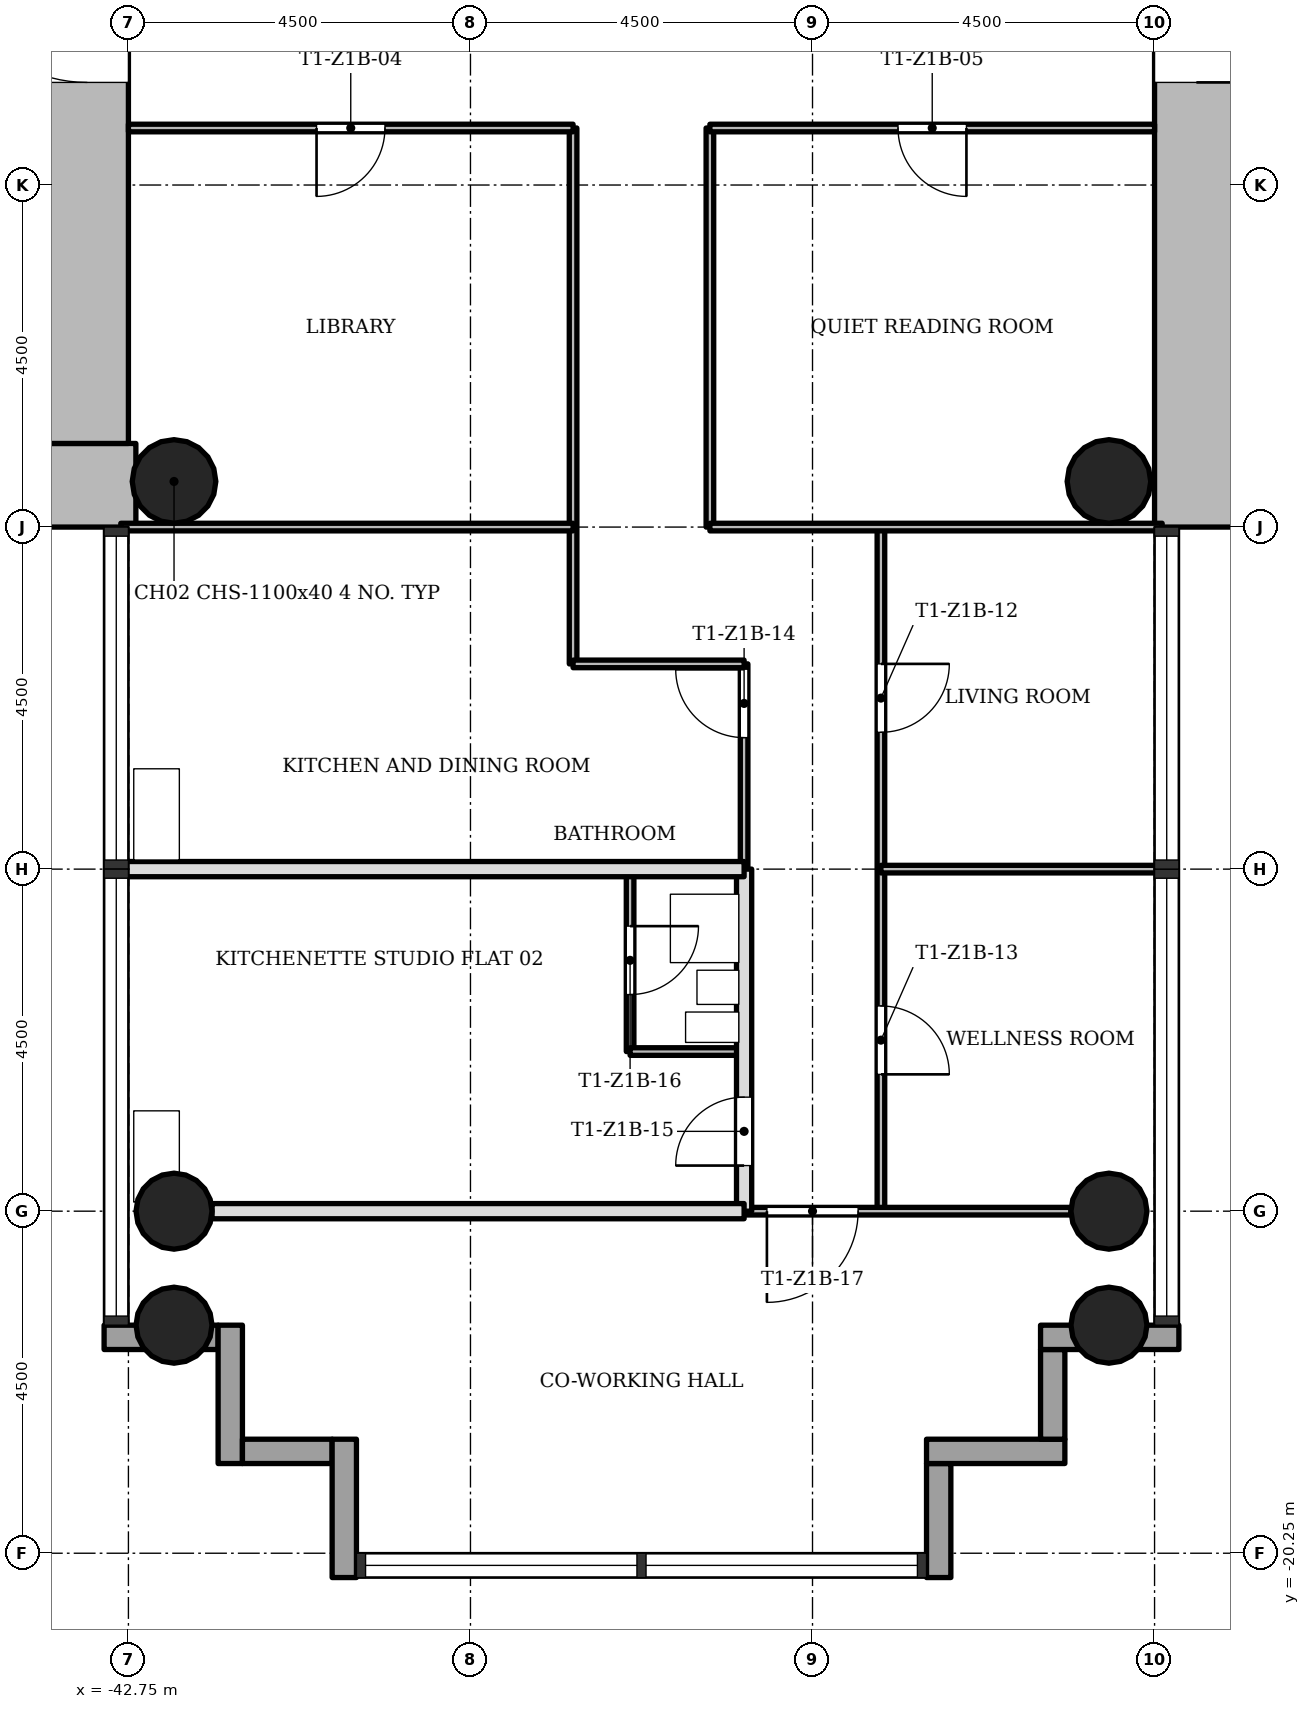
"""IFC4 building model, lengths in metres.
Left out: names, types, materials, properties, quantities, classifications, styles, units other than length and angle.
Written with IfcOpenShell. Run it as: python <this file> out.ifc"""

import sys

from ifc_helpers import new_model, si_unit, direction, frame, frame_2d, origin, origin_2d, place, context, subcontext, project, spatial, rectangle, hollow_circle, extrude, element, fill, save


model = new_model("IFC4")
c1 = context("Model", 3, precision=1e-05, world=origin(), true_north=direction((0.0, 1.0)))
c2 = subcontext(c1, "Body", "Model", "MODEL_VIEW")
j1 = project(units=[si_unit("LENGTHUNIT", "METRE"), si_unit("PLANEANGLEUNIT", "RADIAN")], contexts=[c1])
p1 = place(None, origin())
s1 = spatial("IfcSite", under=j1, at=p1, CompositionType="ELEMENT")
p2 = place(p1, origin())
s2 = spatial("IfcBuilding", under=s1, at=p2, CompositionType="ELEMENT")
p3 = place(p2, frame((0.0, 0.0, 34.7)))
s3 = spatial("IfcBuildingStorey", under=s2, at=p3, CompositionType="ELEMENT", Elevation=34.7)
p4 = place(p3, frame((-28.7, 5.65, 0.0), z_axis=(0.0, 0.0, 1.0), x_axis=(0.0, -1.0, 0.0)))
e1 = element("IfcWall", 1, at=p4, inside=s3, PredefinedType="SHEAR", context=c2, shape_type="SweptSolid", body=[
    extrude(rectangle(XDim=12.4, YDim=1.1, at=frame_2d((6.2, 0.0))), origin(), (0.0, 0.0, 1.0), 3.4),
])
p5 = place(p4, frame((4.75, 0.0, 0.0)))
e2 = element("IfcOpeningElement", 2, at=p5, cuts=e1, PredefinedType="OPENING", context=c2, shape_type="SweptSolid", body=[
    extrude(rectangle(XDim=1.8, YDim=2.1, at=frame_2d((0.9, 1.05))), frame((0.0, 0.56, 0.0), z_axis=(0.0, -1.0, 0.0), x_axis=(1.0, 0.0, 0.0)), (0.0, 0.0, 1.0), 1.12),
])
p6 = place(p3, frame((-50.65, -6.2, 0.0), z_axis=(0.0, 0.0, 1.0), x_axis=(1.0, 0.0, 0.0)))
e3 = element("IfcWall", 3, at=p6, inside=s3, PredefinedType="SHEAR", context=c2, shape_type="SweptSolid", body=[
    extrude(rectangle(XDim=7.998, YDim=1.1, at=frame_2d((3.999, 0.0))), origin(), (0.0, 0.0, 1.0), 3.4),
])
p7 = place(p3, frame((-43.3, -5.65, 0.0), z_axis=(0.0, 0.0, 1.0), x_axis=(0.0, 1.0, 0.0)))
e4 = element("IfcWall", 4, at=p7, inside=s3, PredefinedType="SHEAR", context=c2, shape_type="SweptSolid", body=[
    extrude(rectangle(XDim=12.4, YDim=1.1, at=frame_2d((6.2, 0.0))), origin(), (0.0, 0.0, 1.0), 3.4),
])
p8 = place(p7, frame((4.75, 0.0, 0.0)))
e5 = element("IfcOpeningElement", 5, at=p8, cuts=e4, PredefinedType="OPENING", context=c2, shape_type="SweptSolid", body=[
    extrude(rectangle(XDim=1.8, YDim=2.1, at=frame_2d((0.9, 1.05))), frame((0.0, 0.56, 0.0), z_axis=(0.0, -1.0, 0.0), x_axis=(1.0, 0.0, 0.0)), (0.0, 0.0, 1.0), 1.12),
])
for number, where, z_axis, x_axis in (
    (6, (-42.15, -15.75, 0.0), (0.0, 0.0, 1.0), (1.0, 0.0, 0.0)),
    (7, (-29.85, -15.75, 0.0), (0.0, 0.0, 1.0), (1.0, 0.0, 0.0)),
    (8, (-42.15, -17.25, 0.0), (0.0, 0.0, 1.0), (1.0, 0.0, 0.0)),
    (9, (-29.85, -17.25, 0.0), (0.0, 0.0, 1.0), (1.0, 0.0, 0.0)),
):
    element("IfcColumn", number, at=place(p3, frame(where, z_axis=z_axis, x_axis=x_axis)), inside=s3, PredefinedType="COLUMN", context=c2, shape_type="SweptSolid", body=[
        extrude(hollow_circle(Radius=0.5, WallThickness=0.036, at=origin_2d()), origin(), (0.0, 0.0, 1.0), 3.4),
    ])
for number, where, z_axis, x_axis in (
    (10, (-42.15, -6.15, 0.0), (0.0, 0.0, 1.0), (1.0, 0.0, 0.0)),
    (11, (-29.85, -6.15, 0.0), (0.0, 0.0, 1.0), (1.0, 0.0, 0.0)),
):
    element("IfcColumn", number, at=place(p3, frame(where, z_axis=z_axis, x_axis=x_axis)), inside=s3, PredefinedType="COLUMN", context=c2, shape_type="SweptSolid", body=[
        extrude(hollow_circle(Radius=0.55, WallThickness=0.04, at=origin_2d()), origin(), (0.0, 0.0, 1.0), 3.4),
    ])
p9 = place(p3, frame((-43.07, -17.41, -0.3), z_axis=(0.0, 0.0, 1.0), x_axis=(1.0, 0.0, 0.0)))
e12 = element("IfcWall", 12, at=p9, inside=s3, PredefinedType="STANDARD", context=c2, shape_type="SweptSolid", body=[
    extrude(rectangle(XDim=1.5, YDim=0.32, at=frame_2d((0.75, 0.0))), origin(), (0.0, 0.0, 1.0), 3.4),
])
p10 = place(p3, frame((-41.41, -17.25, -0.3), z_axis=(0.0, 0.0, 1.0), x_axis=(0.0, -1.0, 0.0)))
e13 = element("IfcWall", 13, at=p10, inside=s3, PredefinedType="STANDARD", context=c2, shape_type="SweptSolid", body=[
    extrude(rectangle(XDim=1.82, YDim=0.32, at=frame_2d((0.91, 0.0))), origin(), (0.0, 0.0, 1.0), 3.4),
])
p11 = place(p3, frame((-41.25, -18.91, -0.3), z_axis=(0.0, 0.0, 1.0), x_axis=(1.0, 0.0, 0.0)))
e14 = element("IfcWall", 14, at=p11, inside=s3, PredefinedType="STANDARD", context=c2, shape_type="SweptSolid", body=[
    extrude(rectangle(XDim=1.18, YDim=0.32, at=frame_2d((0.59, 0.0))), origin(), (0.0, 0.0, 1.0), 3.4),
])
p12 = place(p3, frame((-39.91, -18.75, -0.3), z_axis=(0.0, 0.0, 1.0), x_axis=(0.0, -1.0, 0.0)))
e15 = element("IfcWall", 15, at=p12, inside=s3, PredefinedType="STANDARD", context=c2, shape_type="SweptSolid", body=[
    extrude(rectangle(XDim=1.82, YDim=0.32, at=frame_2d((0.91, 0.0))), origin(), (0.0, 0.0, 1.0), 3.4),
])
p13 = place(p3, frame((-32.09, -20.57, -0.3), z_axis=(0.0, 0.0, 1.0), x_axis=(0.0, 1.0, 0.0)))
e16 = element("IfcWall", 16, at=p13, inside=s3, PredefinedType="STANDARD", context=c2, shape_type="SweptSolid", body=[
    extrude(rectangle(XDim=1.5, YDim=0.32, at=frame_2d((0.75, 0.0))), origin(), (0.0, 0.0, 1.0), 3.4),
])
p14 = place(p3, frame((-32.25, -18.91, -0.3), z_axis=(0.0, 0.0, 1.0), x_axis=(1.0, 0.0, 0.0)))
e17 = element("IfcWall", 17, at=p14, inside=s3, PredefinedType="STANDARD", context=c2, shape_type="SweptSolid", body=[
    extrude(rectangle(XDim=1.82, YDim=0.32, at=frame_2d((0.91, 0.0))), origin(), (0.0, 0.0, 1.0), 3.4),
])
p15 = place(p3, frame((-30.59, -18.75, -0.3), z_axis=(0.0, 0.0, 1.0), x_axis=(0.0, 1.0, 0.0)))
e18 = element("IfcWall", 18, at=p15, inside=s3, PredefinedType="STANDARD", context=c2, shape_type="SweptSolid", body=[
    extrude(rectangle(XDim=1.18, YDim=0.32, at=frame_2d((0.59, 0.0))), origin(), (0.0, 0.0, 1.0), 3.4),
])
p16 = place(p3, frame((-30.75, -17.41, -0.3), z_axis=(0.0, 0.0, 1.0), x_axis=(1.0, 0.0, 0.0)))
e19 = element("IfcWall", 19, at=p16, inside=s3, PredefinedType="STANDARD", context=c2, shape_type="SweptSolid", body=[
    extrude(rectangle(XDim=1.82, YDim=0.32, at=frame_2d((0.91, 0.0))), origin(), (0.0, 0.0, 1.0), 3.4),
])
p17 = place(p3, frame((-36.9, -8.55, 0.0), z_axis=(0.0, 0.0, 1.0), x_axis=(0.0, 1.0, 0.0)))
e20 = element("IfcWall", 20, at=p17, inside=s3, PredefinedType="PARTITIONING", context=c2, shape_type="SweptSolid", body=[
    extrude(rectangle(XDim=7.05, YDim=0.1, at=frame_2d((3.525, 0.0))), origin(), (0.0, 0.0, 1.0), 3.0),
])
p18 = place(p3, frame((-36.15, -13.65, 0.0), z_axis=(0.0, 0.0, 1.0), x_axis=(0.0, 1.0, 0.0)))
e21 = element("IfcWall", 21, at=p18, inside=s3, PredefinedType="PARTITIONING", context=c2, shape_type="SweptSolid", body=[
    extrude(rectangle(XDim=2.4, YDim=0.1, at=frame_2d((1.2, 0.0))), origin(), (0.0, 0.0, 1.0), 3.0),
])
p19 = place(p18, frame((0.75, 0.0, 0.0)))
e22 = element("IfcOpeningElement", 22, at=p19, cuts=e21, PredefinedType="OPENING", context=c2, shape_type="SweptSolid", body=[
    extrude(rectangle(XDim=0.9, YDim=2.1, at=frame_2d((0.45, 1.05))), frame((0.0, 0.06, 0.0), z_axis=(0.0, -1.0, 0.0), x_axis=(1.0, 0.0, 0.0)), (0.0, 0.0, 1.0), 0.12),
])
p20 = place(p3, frame((-35.1, -6.75, 0.0), z_axis=(0.0, 0.0, 1.0), x_axis=(0.0, 1.0, 0.0)))
e23 = element("IfcWall", 23, at=p20, inside=s3, PredefinedType="PARTITIONING", context=c2, shape_type="SweptSolid", body=[
    extrude(rectangle(XDim=5.25, YDim=0.1, at=frame_2d((2.625, 0.0))), origin(), (0.0, 0.0, 1.0), 3.0),
])
p21 = place(p3, frame((-34.65, -11.25, 0.0), z_axis=(0.0, 0.0, 1.0), x_axis=(0.0, 1.0, 0.0)))
e24 = element("IfcWall", 24, at=p21, inside=s3, PredefinedType="PARTITIONING", context=c2, shape_type="SweptSolid", body=[
    extrude(rectangle(XDim=2.7, YDim=0.1, at=frame_2d((1.35, 0.0))), origin(), (0.0, 0.0, 1.0), 3.0),
])
p22 = place(p21, frame((1.73, 0.0, 0.0)))
e25 = element("IfcOpeningElement", 25, at=p22, cuts=e24, PredefinedType="OPENING", context=c2, shape_type="SweptSolid", body=[
    extrude(rectangle(XDim=0.9, YDim=2.1, at=frame_2d((0.45, 1.05))), frame((0.0, 0.06, 0.0), z_axis=(0.0, -1.0, 0.0), x_axis=(1.0, 0.0, 0.0)), (0.0, 0.0, 1.0), 0.12),
])
p23 = place(p3, frame((-34.65, -15.75, 0.0), z_axis=(0.0, 0.0, 1.0), x_axis=(0.0, 1.0, 0.0)))
e26 = element("IfcWall", 26, at=p23, inside=s3, PredefinedType="SOLIDWALL", context=c2, shape_type="SweptSolid", body=[
    extrude(rectangle(XDim=4.5, YDim=0.2, at=frame_2d((2.25, 0.0))), origin(), (0.0, 0.0, 1.0), 3.0),
])
p24 = place(p23, frame((0.6, 0.0, 0.0)))
e27 = element("IfcOpeningElement", 27, at=p24, cuts=e26, PredefinedType="OPENING", context=c2, shape_type="SweptSolid", body=[
    extrude(rectangle(XDim=0.9, YDim=2.1, at=frame_2d((0.45, 1.05))), frame((0.0, 0.11, 0.0), z_axis=(0.0, -1.0, 0.0), x_axis=(1.0, 0.0, 0.0)), (0.0, 0.0, 1.0), 0.22),
])
p25 = place(p3, frame((-32.85, -15.75, 0.0), z_axis=(0.0, 0.0, 1.0), x_axis=(0.0, 1.0, 0.0)))
e28 = element("IfcWall", 28, at=p25, inside=s3, PredefinedType="PARTITIONING", context=c2, shape_type="SweptSolid", body=[
    extrude(rectangle(XDim=9.0, YDim=0.1, at=frame_2d((4.5, 0.0))), origin(), (0.0, 0.0, 1.0), 3.0),
])
p26 = place(p25, frame((6.3, 0.0, 0.0)))
e29 = element("IfcOpeningElement", 29, at=p26, cuts=e28, PredefinedType="OPENING", context=c2, shape_type="SweptSolid", body=[
    extrude(rectangle(XDim=0.9, YDim=2.1, at=frame_2d((0.45, 1.05))), frame((0.0, 0.06, 0.0), z_axis=(0.0, -1.0, 0.0), x_axis=(1.0, 0.0, 0.0)), (0.0, 0.0, 1.0), 0.12),
])
p27 = place(p25, frame((1.8, 0.0, 0.0)))
e30 = element("IfcOpeningElement", 30, at=p27, cuts=e28, PredefinedType="OPENING", context=c2, shape_type="SweptSolid", body=[
    extrude(rectangle(XDim=0.9, YDim=2.1, at=frame_2d((0.45, 1.05))), frame((0.0, 0.06, 0.0), z_axis=(0.0, -1.0, 0.0), x_axis=(1.0, 0.0, 0.0)), (0.0, 0.0, 1.0), 0.12),
])
p28 = place(p3, frame((-34.65, -15.75, 0.0), z_axis=(0.0, 0.0, 1.0), x_axis=(1.0, 0.0, 0.0)))
e31 = element("IfcWall", 31, at=p28, inside=s3, PredefinedType="PARTITIONING", context=c2, shape_type="SweptSolid", body=[
    extrude(rectangle(XDim=4.3, YDim=0.1, at=frame_2d((2.15, 0.0))), origin(), (0.0, 0.0, 1.0), 3.0),
])
p29 = place(p28, frame((0.3, 0.0, 0.0)))
e32 = element("IfcOpeningElement", 32, at=p29, cuts=e31, PredefinedType="OPENING", context=c2, shape_type="SweptSolid", body=[
    extrude(rectangle(XDim=1.2, YDim=2.1, at=frame_2d((0.6, 1.05))), frame((0.0, 0.06, 0.0), z_axis=(0.0, -1.0, 0.0), x_axis=(1.0, 0.0, 0.0)), (0.0, 0.0, 1.0), 0.12),
])
p30 = place(p3, frame((-41.65, -15.75, 0.0), z_axis=(0.0, 0.0, 1.0), x_axis=(1.0, 0.0, 0.0)))
e33 = element("IfcWall", 33, at=p30, inside=s3, PredefinedType="SOLIDWALL", context=c2, shape_type="SweptSolid", body=[
    extrude(rectangle(XDim=7.0, YDim=0.2, at=frame_2d((3.5, 0.0))), origin(), (0.0, 0.0, 1.0), 3.0),
])
p31 = place(p3, frame((-36.15, -13.65, 0.0), z_axis=(0.0, 0.0, 1.0), x_axis=(1.0, 0.0, 0.0)))
e34 = element("IfcWall", 34, at=p31, inside=s3, PredefinedType="PARTITIONING", context=c2, shape_type="SweptSolid", body=[
    extrude(rectangle(XDim=1.5, YDim=0.1, at=frame_2d((0.75, 0.0))), origin(), (0.0, 0.0, 1.0), 3.0),
])
p32 = place(p3, frame((-32.85, -11.25, 0.0), z_axis=(0.0, 0.0, 1.0), x_axis=(1.0, 0.0, 0.0)))
e35 = element("IfcWall", 35, at=p32, inside=s3, PredefinedType="PARTITIONING", context=c2, shape_type="SweptSolid", body=[
    extrude(rectangle(XDim=3.7, YDim=0.1, at=frame_2d((1.85, 0.0))), origin(), (0.0, 0.0, 1.0), 3.0),
])
p33 = place(p3, frame((-42.85, -11.25, 0.0), z_axis=(0.0, 0.0, 1.0), x_axis=(1.0, 0.0, 0.0)))
e36 = element("IfcWall", 36, at=p33, inside=s3, PredefinedType="SOLIDWALL", context=c2, shape_type="SweptSolid", body=[
    extrude(rectangle(XDim=8.2, YDim=0.2, at=frame_2d((4.1, 0.0))), origin(), (0.0, 0.0, 1.0), 3.0),
])
p34 = place(p3, frame((-36.9, -8.55, 0.0), z_axis=(0.0, 0.0, 1.0), x_axis=(1.0, 0.0, 0.0)))
e37 = element("IfcWall", 37, at=p34, inside=s3, PredefinedType="PARTITIONING", context=c2, shape_type="SweptSolid", body=[
    extrude(rectangle(XDim=2.25, YDim=0.1, at=frame_2d((1.125, 0.0))), origin(), (0.0, 0.0, 1.0), 3.0),
])
for number, where, z_axis, x_axis in (
    (38, (-42.85, -6.75, 0.0), (0.0, 0.0, 1.0), (1.0, 0.0, 0.0)),
    (39, (-35.1, -6.75, 0.0), (0.0, 0.0, 1.0), (1.0, 0.0, 0.0)),
):
    element("IfcWall", number, at=place(p3, frame(where, z_axis=z_axis, x_axis=x_axis)), inside=s3, PredefinedType="PARTITIONING", context=c2, shape_type="SweptSolid", body=[
        extrude(rectangle(XDim=5.95, YDim=0.1, at=frame_2d((2.975, 0.0))), origin(), (0.0, 0.0, 1.0), 3.0),
    ])
p35 = place(p3, frame((-42.75, -1.5, 0.0), z_axis=(0.0, 0.0, 1.0), x_axis=(1.0, 0.0, 0.0)))
e40 = element("IfcWall", 40, at=p35, inside=s3, PredefinedType="PARTITIONING", context=c2, shape_type="SweptSolid", body=[
    extrude(rectangle(XDim=5.85, YDim=0.1, at=frame_2d((2.925, 0.0))), origin(), (0.0, 0.0, 1.0), 3.0),
])
p36 = place(p35, frame((2.475, 0.0, 0.0)))
e41 = element("IfcOpeningElement", 41, at=p36, cuts=e40, PredefinedType="OPENING", context=c2, shape_type="SweptSolid", body=[
    extrude(rectangle(XDim=0.9, YDim=2.1, at=frame_2d((0.45, 1.05))), frame((0.0, 0.06, 0.0), z_axis=(0.0, -1.0, 0.0), x_axis=(1.0, 0.0, 0.0)), (0.0, 0.0, 1.0), 0.12),
])
p37 = place(p3, frame((-35.1, -1.5, 0.0), z_axis=(0.0, 0.0, 1.0), x_axis=(1.0, 0.0, 0.0)))
e42 = element("IfcWall", 42, at=p37, inside=s3, PredefinedType="PARTITIONING", context=c2, shape_type="SweptSolid", body=[
    extrude(rectangle(XDim=5.85, YDim=0.1, at=frame_2d((2.925, 0.0))), origin(), (0.0, 0.0, 1.0), 3.0),
])
p38 = place(p37, frame((2.475, 0.0, 0.0)))
e43 = element("IfcOpeningElement", 43, at=p38, cuts=e42, PredefinedType="OPENING", context=c2, shape_type="SweptSolid", body=[
    extrude(rectangle(XDim=0.9, YDim=2.1, at=frame_2d((0.45, 1.05))), frame((0.0, 0.06, 0.0), z_axis=(0.0, -1.0, 0.0), x_axis=(1.0, 0.0, 0.0)), (0.0, 0.0, 1.0), 0.12),
])
p39 = place(p36, origin())
e44 = element("IfcDoor", 44, at=p39, inside=s3, OperationType="SINGLE_SWING_LEFT", PredefinedType="DOOR", context=c2, shape_type="SweptSolid", body=[
    extrude(rectangle(XDim=0.9, YDim=2.1, at=frame_2d((0.45, 1.05))), frame((0.0, 0.025, 0.0), z_axis=(0.0, -1.0, 0.0), x_axis=(1.0, 0.0, 0.0)), (0.0, 0.0, 1.0), 0.05),
])
fill(e41, e44)
p40 = place(p38, origin())
e45 = element("IfcDoor", 45, at=p40, inside=s3, OperationType="SINGLE_SWING_RIGHT", PredefinedType="DOOR", context=c2, shape_type="SweptSolid", body=[
    extrude(rectangle(XDim=0.9, YDim=2.1, at=frame_2d((0.45, 1.05))), frame((0.0, 0.025, 0.0), z_axis=(0.0, -1.0, 0.0), x_axis=(1.0, 0.0, 0.0)), (0.0, 0.0, 1.0), 0.05),
])
fill(e43, e45)
p41 = place(p26, origin())
e46 = element("IfcDoor", 46, at=p41, inside=s3, OperationType="SINGLE_SWING_RIGHT", PredefinedType="DOOR", context=c2, shape_type="SweptSolid", body=[
    extrude(rectangle(XDim=0.9, YDim=2.1, at=frame_2d((0.45, 1.05))), frame((0.0, 0.025, 0.0), z_axis=(0.0, -1.0, 0.0), x_axis=(1.0, 0.0, 0.0)), (0.0, 0.0, 1.0), 0.05),
])
fill(e29, e46)
p42 = place(p27, origin())
e47 = element("IfcDoor", 47, at=p42, inside=s3, OperationType="SINGLE_SWING_LEFT", PredefinedType="DOOR", context=c2, shape_type="SweptSolid", body=[
    extrude(rectangle(XDim=0.9, YDim=2.1, at=frame_2d((0.45, 1.05))), frame((0.0, 0.025, 0.0), z_axis=(0.0, -1.0, 0.0), x_axis=(1.0, 0.0, 0.0)), (0.0, 0.0, 1.0), 0.05),
])
fill(e30, e47)
p43 = place(p22, origin())
e48 = element("IfcDoor", 48, at=p43, inside=s3, OperationType="SINGLE_SWING_LEFT", PredefinedType="DOOR", context=c2, shape_type="SweptSolid", body=[
    extrude(rectangle(XDim=0.9, YDim=2.1, at=frame_2d((0.45, 1.05))), frame((0.0, 0.025, 0.0), z_axis=(0.0, -1.0, 0.0), x_axis=(1.0, 0.0, 0.0)), (0.0, 0.0, 1.0), 0.05),
])
fill(e25, e48)
p44 = place(p24, origin())
e49 = element("IfcDoor", 49, at=p44, inside=s3, OperationType="SINGLE_SWING_RIGHT", PredefinedType="DOOR", context=c2, shape_type="SweptSolid", body=[
    extrude(rectangle(XDim=0.9, YDim=2.1, at=frame_2d((0.45, 1.05))), frame((0.0, 0.025, 0.0), z_axis=(0.0, -1.0, 0.0), x_axis=(1.0, 0.0, 0.0)), (0.0, 0.0, 1.0), 0.05),
])
fill(e27, e49)
p45 = place(p19, origin())
e50 = element("IfcDoor", 50, at=p45, inside=s3, OperationType="SINGLE_SWING_RIGHT", PredefinedType="DOOR", context=c2, shape_type="SweptSolid", body=[
    extrude(rectangle(XDim=0.9, YDim=2.1, at=frame_2d((0.45, 1.05))), frame((0.0, 0.025, 0.0), z_axis=(0.0, -1.0, 0.0), x_axis=(1.0, 0.0, 0.0)), (0.0, 0.0, 1.0), 0.05),
])
fill(e22, e50)
p46 = place(p29, origin())
e51 = element("IfcDoor", 51, at=p46, inside=s3, OperationType="SINGLE_SWING_LEFT", PredefinedType="DOOR", context=c2, shape_type="SweptSolid", body=[
    extrude(rectangle(XDim=1.2, YDim=2.1, at=frame_2d((0.6, 1.05))), frame((0.0, 0.025, 0.0), z_axis=(0.0, -1.0, 0.0), x_axis=(1.0, 0.0, 0.0)), (0.0, 0.0, 1.0), 0.05),
])
fill(e32, e51)
p47 = place(p5, origin())
e52 = element("IfcDoor", 52, at=p47, inside=s3, OperationType="SINGLE_SWING_LEFT", PredefinedType="DOOR", context=c2, shape_type="SweptSolid", body=[
    extrude(rectangle(XDim=1.8, YDim=2.1, at=frame_2d((0.9, 1.05))), frame((0.0, 0.025, 0.0), z_axis=(0.0, -1.0, 0.0), x_axis=(1.0, 0.0, 0.0)), (0.0, 0.0, 1.0), 0.05),
])
fill(e2, e52)
p48 = place(p8, origin())
e53 = element("IfcDoor", 53, at=p48, inside=s3, OperationType="SINGLE_SWING_LEFT", PredefinedType="DOOR", context=c2, shape_type="SweptSolid", body=[
    extrude(rectangle(XDim=1.8, YDim=2.1, at=frame_2d((0.9, 1.05))), frame((0.0, 0.025, 0.0), z_axis=(0.0, -1.0, 0.0), x_axis=(1.0, 0.0, 0.0)), (0.0, 0.0, 1.0), 0.05),
])
fill(e5, e53)
save(model, sys.argv[1])
